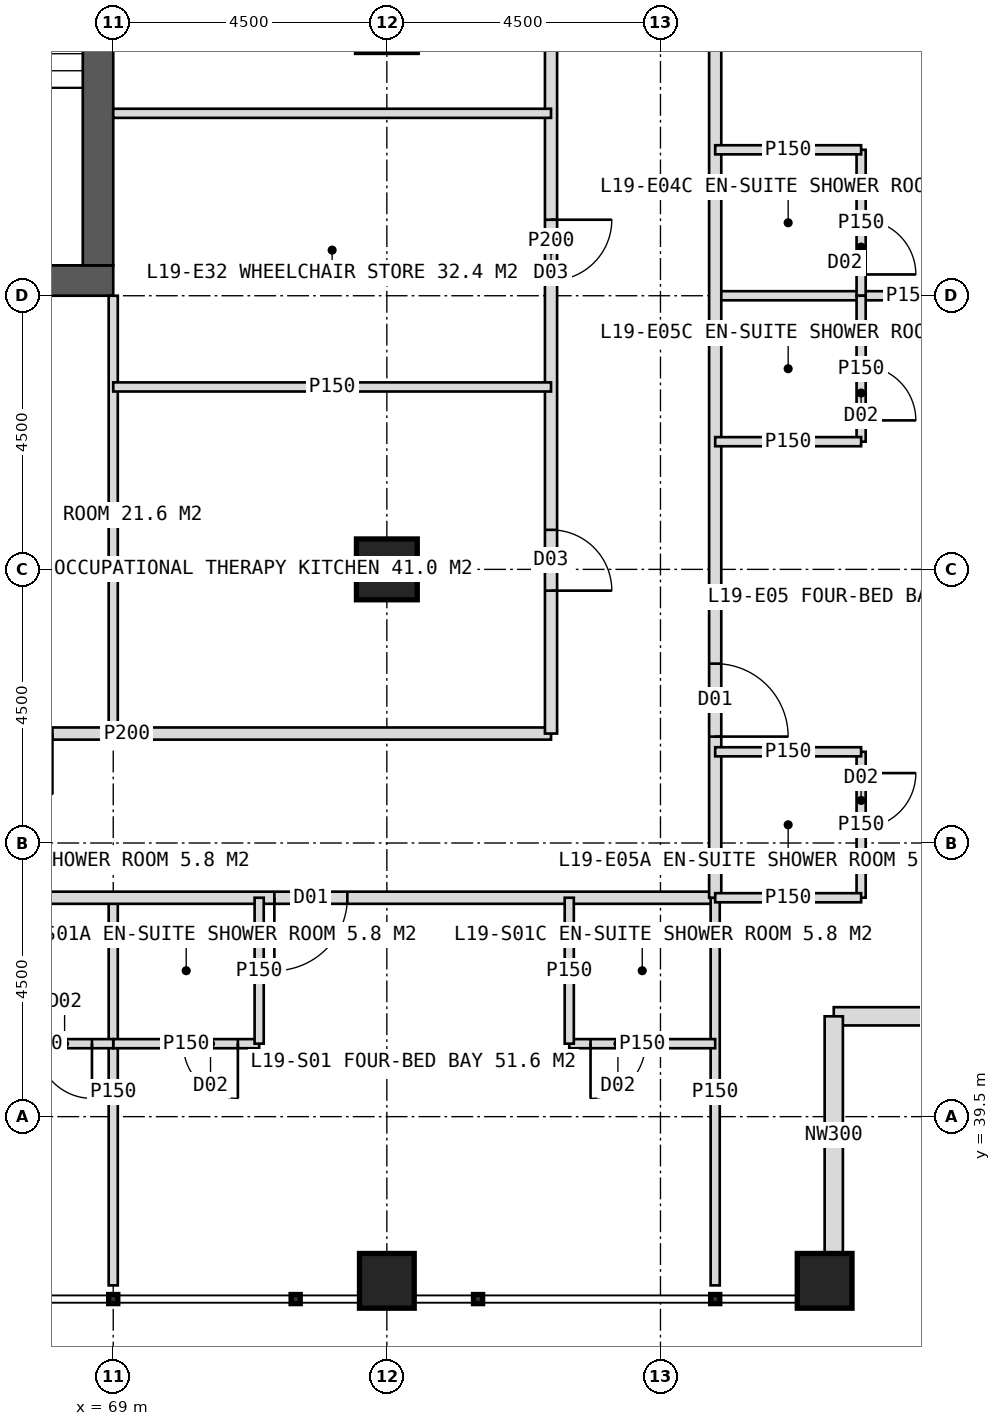
"""IFC4 building model, lengths in metres.
Left out: names, types, materials, properties, quantities, classifications, styles, units other than length and angle.
Written with IfcOpenShell. Run it as: python <this file> out.ifc"""

import sys

from ifc_helpers import new_model, si_unit, direction, frame, frame_2d, origin, origin_2d, place, context, subcontext, project, spatial, rectangle, hollow_rectangle, extrude, element, fill, save


model = new_model("IFC4")
c1 = context("Model", 3, precision=1e-05, world=origin(), true_north=direction((0.0, 1.0)))
c2 = subcontext(c1, "Body", "Model", "MODEL_VIEW")
j1 = project(units=[si_unit("LENGTHUNIT", "METRE"), si_unit("PLANEANGLEUNIT", "RADIAN")], contexts=[c1])
p1 = place(None, origin())
s1 = spatial("IfcSite", under=j1, at=p1, CompositionType="ELEMENT")
p2 = place(p1, origin())
s2 = spatial("IfcBuilding", under=s1, at=p2, CompositionType="ELEMENT")
p3 = place(p2, frame((0.0, 0.0, 83.0)))
s3 = spatial("IfcBuildingStorey", under=s2, at=p3, CompositionType="ELEMENT", Elevation=83.0)
p4 = place(p3, frame((51.0, 53.25, 0.0), z_axis=(0.0, 0.0, 1.0), x_axis=(1.0, 0.0, 0.0)))
e1 = element("IfcWall", 1, at=p4, inside=s3, PredefinedType="SHEAR", context=c2, shape_type="SweptSolid", body=[
    extrude(rectangle(XDim=18.0, YDim=0.5, at=frame_2d((9.0, 0.0))), origin(), (0.0, 0.0, 1.0), 4.0),
])
p5 = place(p4, frame((8.1, 0.0, 0.0)))
e2 = element("IfcOpeningElement", 2, at=p5, cuts=e1, PredefinedType="OPENING", context=c2, shape_type="SweptSolid", body=[
    extrude(rectangle(XDim=1.8, YDim=2.2, at=frame_2d((0.9, 1.1))), frame((0.0, 0.26, 0.0), z_axis=(0.0, -1.0, 0.0), x_axis=(1.0, 0.0, 0.0)), (0.0, 0.0, 1.0), 0.52),
])
p6 = place(p3, frame((68.75, 53.5, 0.0), z_axis=(0.0, 0.0, 1.0), x_axis=(0.0, 1.0, 0.0)))
e3 = element("IfcWall", 3, at=p6, inside=s3, PredefinedType="SHEAR", context=c2, shape_type="SweptSolid", body=[
    extrude(rectangle(XDim=17.0, YDim=0.5, at=frame_2d((8.5, 0.0))), origin(), (0.0, 0.0, 1.0), 4.0),
])
p7 = place(p6, frame((9.5, 0.0, 0.0)))
e4 = element("IfcOpeningElement", 4, at=p7, cuts=e3, PredefinedType="OPENING", context=c2, shape_type="SweptSolid", body=[
    extrude(rectangle(XDim=1.5, YDim=2.2, at=frame_2d((0.75, 1.1))), frame((0.0, 0.26, 0.0), z_axis=(0.0, -1.0, 0.0), x_axis=(1.0, 0.0, 0.0)), (0.0, 0.0, 1.0), 0.52),
])
p8 = place(p3, frame((73.5, 48.5, 0.0), z_axis=(0.0, 0.0, 1.0), x_axis=(1.0, 0.0, 0.0)))
e5 = element("IfcColumn", 5, at=p8, inside=s3, PredefinedType="COLUMN", context=c2, shape_type="SweptSolid", body=[
    extrude(hollow_rectangle(XDim=1.0, YDim=1.0, WallThickness=0.1, at=origin_2d()), origin(), (0.0, 0.0, 1.0), 4.0),
])
for number, where, z_axis, x_axis in (
    (6, (73.5, 36.8, 0.0), (0.0, 0.0, 1.0), (1.0, 0.0, 0.0)),
    (7, (80.7, 36.8, 0.0), (0.0, 0.0, 1.0), (1.0, 0.0, 0.0)),
):
    element("IfcColumn", number, at=place(p3, frame(where, z_axis=z_axis, x_axis=x_axis)), inside=s3, PredefinedType="COLUMN", context=c2, shape_type="SweptSolid", body=[
        extrude(hollow_rectangle(XDim=0.9, YDim=0.9, WallThickness=0.08, at=origin_2d()), origin(), (0.0, 0.0, 1.0), 4.0),
    ])
for number, where, z_axis, x_axis in (
    (8, (84.75, 41.15, 0.0), (0.0, 0.0, 1.0), (-1.0, 0.0, 0.0)),
    (9, (80.85, 41.15, 0.0), (0.0, 0.0, 1.0), (0.0, -1.0, 0.0)),
):
    element("IfcWall", number, at=place(p3, frame(where, z_axis=z_axis, x_axis=x_axis)), inside=s3, PredefinedType="ELEMENTEDWALL", context=c2, shape_type="SweptSolid", body=[
        extrude(rectangle(XDim=3.9, YDim=0.3, at=frame_2d((1.95, 0.0))), origin(), (0.0, 0.0, 1.0), 2.95),
    ])
p9 = place(p3, frame((69.0, 43.1, 0.0), z_axis=(0.0, 0.0, 1.0), x_axis=(0.0, -1.0, 0.0)))
e10 = element("IfcWall", 10, at=p9, inside=s3, PredefinedType="PARTITIONING", context=c2, shape_type="SweptSolid", body=[
    extrude(rectangle(XDim=6.375, YDim=0.15, at=frame_2d((3.188, 0.0))), origin(), (0.0, 0.0, 1.0), 3.75),
])
p10 = place(p3, frame((78.9, 43.1, 0.0), z_axis=(0.0, 0.0, 1.0), x_axis=(-1.0, 0.0, 0.0)))
e11 = element("IfcWall", 11, at=p10, inside=s3, PredefinedType="PARTITIONING", context=c2, shape_type="SweptSolid", body=[
    extrude(rectangle(XDim=37.8, YDim=0.2, at=frame_2d((18.9, 0.0))), origin(), (0.0, 0.0, 1.0), 3.75),
])
p11 = place(p10, frame((6.05, 0.0, 0.0)))
e12 = element("IfcOpeningElement", 12, at=p11, cuts=e11, PredefinedType="OPENING", context=c2, shape_type="SweptSolid", body=[
    extrude(rectangle(XDim=1.2, YDim=2.2, at=frame_2d((0.6, 1.1))), frame((0.0, 0.11, 0.0), z_axis=(0.0, -1.0, 0.0), x_axis=(1.0, 0.0, 0.0)), (0.0, 0.0, 1.0), 0.22),
])
p12 = place(p10, frame((12.55, 0.0, 0.0)))
e13 = element("IfcOpeningElement", 13, at=p12, cuts=e11, PredefinedType="OPENING", context=c2, shape_type="SweptSolid", body=[
    extrude(rectangle(XDim=1.2, YDim=2.2, at=frame_2d((0.6, 1.1))), frame((0.0, 0.11, 0.0), z_axis=(0.0, -1.0, 0.0), x_axis=(1.0, 0.0, 0.0)), (0.0, 0.0, 1.0), 0.22),
])
p13 = place(p10, frame((21.05, 0.0, 0.0)))
e14 = element("IfcOpeningElement", 14, at=p13, cuts=e11, PredefinedType="OPENING", context=c2, shape_type="SweptSolid", body=[
    extrude(rectangle(XDim=1.2, YDim=2.2, at=frame_2d((0.6, 1.1))), frame((0.0, 0.11, 0.0), z_axis=(0.0, -1.0, 0.0), x_axis=(1.0, 0.0, 0.0)), (0.0, 0.0, 1.0), 0.22),
])
p14 = place(p10, frame((27.55, 0.0, 0.0)))
e15 = element("IfcOpeningElement", 15, at=p14, cuts=e11, PredefinedType="OPENING", context=c2, shape_type="SweptSolid", body=[
    extrude(rectangle(XDim=1.2, YDim=2.2, at=frame_2d((0.6, 1.1))), frame((0.0, 0.11, 0.0), z_axis=(0.0, -1.0, 0.0), x_axis=(1.0, 0.0, 0.0)), (0.0, 0.0, 1.0), 0.22),
])
p15 = place(p3, frame((78.9, 43.1, 0.0), z_axis=(0.0, 0.0, 1.0), x_axis=(0.0, -1.0, 0.0)))
e16 = element("IfcWall", 16, at=p15, inside=s3, PredefinedType="PARTITIONING", context=c2, shape_type="SweptSolid", body=[
    extrude(rectangle(XDim=6.375, YDim=0.15, at=frame_2d((3.188, 0.0))), origin(), (0.0, 0.0, 1.0), 3.75),
])
p16 = place(p3, frame((71.4, 40.7, 0.0), z_axis=(0.0, 0.0, 1.0), x_axis=(-1.0, 0.0, 0.0)))
e17 = element("IfcWall", 17, at=p16, inside=s3, PredefinedType="PARTITIONING", context=c2, shape_type="SweptSolid", body=[
    extrude(rectangle(XDim=2.4, YDim=0.15, at=frame_2d((1.2, 0.0))), origin(), (0.0, 0.0, 1.0), 3.75),
])
p17 = place(p16, frame((0.35, 0.0, 0.0)))
e18 = element("IfcOpeningElement", 18, at=p17, cuts=e17, PredefinedType="OPENING", context=c2, shape_type="SweptSolid", body=[
    extrude(rectangle(XDim=0.9, YDim=2.1, at=frame_2d((0.45, 1.05))), frame((0.0, 0.085, 0.0), z_axis=(0.0, -1.0, 0.0), x_axis=(1.0, 0.0, 0.0)), (0.0, 0.0, 1.0), 0.17),
])
p18 = place(p3, frame((71.4, 43.1, 0.0), z_axis=(0.0, 0.0, 1.0), x_axis=(0.0, -1.0, 0.0)))
e19 = element("IfcWall", 19, at=p18, inside=s3, PredefinedType="PARTITIONING", context=c2, shape_type="SweptSolid", body=[
    extrude(rectangle(XDim=2.4, YDim=0.15, at=frame_2d((1.2, 0.0))), origin(), (0.0, 0.0, 1.0), 3.75),
])
p19 = place(p3, frame((78.9, 40.7, 0.0), z_axis=(0.0, 0.0, 1.0), x_axis=(-1.0, 0.0, 0.0)))
e20 = element("IfcWall", 20, at=p19, inside=s3, PredefinedType="PARTITIONING", context=c2, shape_type="SweptSolid", body=[
    extrude(rectangle(XDim=2.4, YDim=0.15, at=frame_2d((1.2, 0.0))), origin(), (0.0, 0.0, 1.0), 3.75),
])
p20 = place(p19, frame((1.15, 0.0, 0.0)))
e21 = element("IfcOpeningElement", 21, at=p20, cuts=e20, PredefinedType="OPENING", context=c2, shape_type="SweptSolid", body=[
    extrude(rectangle(XDim=0.9, YDim=2.1, at=frame_2d((0.45, 1.05))), frame((0.0, 0.085, 0.0), z_axis=(0.0, -1.0, 0.0), x_axis=(1.0, 0.0, 0.0)), (0.0, 0.0, 1.0), 0.17),
])
p21 = place(p3, frame((76.5, 43.1, 0.0), z_axis=(0.0, 0.0, 1.0), x_axis=(0.0, -1.0, 0.0)))
e22 = element("IfcWall", 22, at=p21, inside=s3, PredefinedType="PARTITIONING", context=c2, shape_type="SweptSolid", body=[
    extrude(rectangle(XDim=2.4, YDim=0.15, at=frame_2d((1.2, 0.0))), origin(), (0.0, 0.0, 1.0), 3.75),
])
p22 = place(p3, frame((69.0, 40.7, 0.0), z_axis=(0.0, 0.0, 1.0), x_axis=(-1.0, 0.0, 0.0)))
e23 = element("IfcWall", 23, at=p22, inside=s3, PredefinedType="PARTITIONING", context=c2, shape_type="SweptSolid", body=[
    extrude(rectangle(XDim=2.4, YDim=0.15, at=frame_2d((1.2, 0.0))), origin(), (0.0, 0.0, 1.0), 3.75),
])
p23 = place(p22, frame((0.35, 0.0, 0.0)))
e24 = element("IfcOpeningElement", 24, at=p23, cuts=e23, PredefinedType="OPENING", context=c2, shape_type="SweptSolid", body=[
    extrude(rectangle(XDim=0.9, YDim=2.1, at=frame_2d((0.45, 1.05))), frame((0.0, 0.085, 0.0), z_axis=(0.0, -1.0, 0.0), x_axis=(1.0, 0.0, 0.0)), (0.0, 0.0, 1.0), 0.17),
])
p24 = place(p3, frame((69.0, 53.0, 0.0), z_axis=(0.0, 0.0, 1.0), x_axis=(0.0, -1.0, 0.0)))
e25 = element("IfcWall", 25, at=p24, inside=s3, PredefinedType="PARTITIONING", context=c2, shape_type="SweptSolid", body=[
    extrude(rectangle(XDim=7.2, YDim=0.15, at=frame_2d((3.6, 0.0))), origin(), (0.0, 0.0, 1.0), 3.75),
])
p25 = place(p3, frame((76.2, 45.8, 0.0), z_axis=(0.0, 0.0, 1.0), x_axis=(-1.0, 0.0, 0.0)))
e26 = element("IfcWall", 26, at=p25, inside=s3, PredefinedType="PARTITIONING", context=c2, shape_type="SweptSolid", body=[
    extrude(rectangle(XDim=13.95, YDim=0.2, at=frame_2d((6.975, 0.0))), origin(), (0.0, 0.0, 1.0), 3.75),
])
p26 = place(p25, frame((8.2, 0.0, 0.0)))
e27 = element("IfcOpeningElement", 27, at=p26, cuts=e26, PredefinedType="OPENING", context=c2, shape_type="SweptSolid", body=[
    extrude(rectangle(XDim=1.0, YDim=2.1, at=frame_2d((0.5, 1.05))), frame((0.0, 0.11, 0.0), z_axis=(0.0, -1.0, 0.0), x_axis=(1.0, 0.0, 0.0)), (0.0, 0.0, 1.0), 0.22),
])
p27 = place(p25, frame((11.575, 0.0, 0.0)))
e28 = element("IfcOpeningElement", 28, at=p27, cuts=e26, PredefinedType="OPENING", context=c2, shape_type="SweptSolid", body=[
    extrude(rectangle(XDim=1.0, YDim=2.1, at=frame_2d((0.5, 1.05))), frame((0.0, 0.11, 0.0), z_axis=(0.0, -1.0, 0.0), x_axis=(1.0, 0.0, 0.0)), (0.0, 0.0, 1.0), 0.22),
])
p28 = place(p3, frame((78.9, 53.0, 0.0), z_axis=(0.0, 0.0, 1.0), x_axis=(1.0, 0.0, 0.0)))
e29 = element("IfcWall", 29, at=p28, inside=s3, PredefinedType="PARTITIONING", context=c2, shape_type="SweptSolid", body=[
    extrude(rectangle(XDim=6.375, YDim=0.15, at=frame_2d((3.188, 0.0))), origin(), (0.0, 0.0, 1.0), 3.75),
])
p29 = place(p3, frame((78.9, 80.9, 0.0), z_axis=(0.0, 0.0, 1.0), x_axis=(0.0, -1.0, 0.0)))
e30 = element("IfcWall", 30, at=p29, inside=s3, PredefinedType="PARTITIONING", context=c2, shape_type="SweptSolid", body=[
    extrude(rectangle(XDim=37.8, YDim=0.2, at=frame_2d((18.9, 0.0))), origin(), (0.0, 0.0, 1.0), 3.75),
])
p30 = place(p29, frame((2.45, 0.0, 0.0)))
e31 = element("IfcOpeningElement", 31, at=p30, cuts=e30, PredefinedType="OPENING", context=c2, shape_type="SweptSolid", body=[
    extrude(rectangle(XDim=1.2, YDim=2.2, at=frame_2d((0.6, 1.1))), frame((0.0, 0.11, 0.0), z_axis=(0.0, -1.0, 0.0), x_axis=(1.0, 0.0, 0.0)), (0.0, 0.0, 1.0), 0.22),
])
p31 = place(p29, frame((9.55, 0.0, 0.0)))
e32 = element("IfcOpeningElement", 32, at=p31, cuts=e30, PredefinedType="OPENING", context=c2, shape_type="SweptSolid", body=[
    extrude(rectangle(XDim=1.2, YDim=2.2, at=frame_2d((0.6, 1.1))), frame((0.0, 0.11, 0.0), z_axis=(0.0, -1.0, 0.0), x_axis=(1.0, 0.0, 0.0)), (0.0, 0.0, 1.0), 0.22),
])
p32 = place(p29, frame((15.05, 0.0, 0.0)))
e33 = element("IfcOpeningElement", 33, at=p32, cuts=e30, PredefinedType="OPENING", context=c2, shape_type="SweptSolid", body=[
    extrude(rectangle(XDim=1.2, YDim=2.2, at=frame_2d((0.6, 1.1))), frame((0.0, 0.11, 0.0), z_axis=(0.0, -1.0, 0.0), x_axis=(1.0, 0.0, 0.0)), (0.0, 0.0, 1.0), 0.22),
])
p33 = place(p29, frame((21.55, 0.0, 0.0)))
e34 = element("IfcOpeningElement", 34, at=p33, cuts=e30, PredefinedType="OPENING", context=c2, shape_type="SweptSolid", body=[
    extrude(rectangle(XDim=1.2, YDim=2.2, at=frame_2d((0.6, 1.1))), frame((0.0, 0.11, 0.0), z_axis=(0.0, -1.0, 0.0), x_axis=(1.0, 0.0, 0.0)), (0.0, 0.0, 1.0), 0.22),
])
p34 = place(p29, frame((33.95, 0.0, 0.0)))
e35 = element("IfcOpeningElement", 35, at=p34, cuts=e30, PredefinedType="OPENING", context=c2, shape_type="SweptSolid", body=[
    extrude(rectangle(XDim=1.2, YDim=2.2, at=frame_2d((0.6, 1.1))), frame((0.0, 0.11, 0.0), z_axis=(0.0, -1.0, 0.0), x_axis=(1.0, 0.0, 0.0)), (0.0, 0.0, 1.0), 0.22),
])
p35 = place(p3, frame((81.3, 55.4, 0.0), z_axis=(0.0, 0.0, 1.0), x_axis=(0.0, -1.0, 0.0)))
e36 = element("IfcWall", 36, at=p35, inside=s3, PredefinedType="PARTITIONING", context=c2, shape_type="SweptSolid", body=[
    extrude(rectangle(XDim=2.4, YDim=0.15, at=frame_2d((1.2, 0.0))), origin(), (0.0, 0.0, 1.0), 3.75),
])
p36 = place(p35, frame((1.15, 0.0, 0.0)))
e37 = element("IfcOpeningElement", 37, at=p36, cuts=e36, PredefinedType="OPENING", context=c2, shape_type="SweptSolid", body=[
    extrude(rectangle(XDim=0.9, YDim=2.1, at=frame_2d((0.45, 1.05))), frame((0.0, 0.085, 0.0), z_axis=(0.0, -1.0, 0.0), x_axis=(1.0, 0.0, 0.0)), (0.0, 0.0, 1.0), 0.17),
])
p37 = place(p3, frame((78.9, 55.4, 0.0), z_axis=(0.0, 0.0, 1.0), x_axis=(1.0, 0.0, 0.0)))
e38 = element("IfcWall", 38, at=p37, inside=s3, PredefinedType="PARTITIONING", context=c2, shape_type="SweptSolid", body=[
    extrude(rectangle(XDim=2.4, YDim=0.15, at=frame_2d((1.2, 0.0))), origin(), (0.0, 0.0, 1.0), 3.75),
])
p38 = place(p3, frame((81.3, 45.5, 0.0), z_axis=(0.0, 0.0, 1.0), x_axis=(0.0, -1.0, 0.0)))
e39 = element("IfcWall", 39, at=p38, inside=s3, PredefinedType="PARTITIONING", context=c2, shape_type="SweptSolid", body=[
    extrude(rectangle(XDim=2.4, YDim=0.15, at=frame_2d((1.2, 0.0))), origin(), (0.0, 0.0, 1.0), 3.75),
])
p39 = place(p38, frame((0.35, 0.0, 0.0)))
e40 = element("IfcOpeningElement", 40, at=p39, cuts=e39, PredefinedType="OPENING", context=c2, shape_type="SweptSolid", body=[
    extrude(rectangle(XDim=0.9, YDim=2.1, at=frame_2d((0.45, 1.05))), frame((0.0, 0.085, 0.0), z_axis=(0.0, -1.0, 0.0), x_axis=(1.0, 0.0, 0.0)), (0.0, 0.0, 1.0), 0.17),
])
p40 = place(p3, frame((78.9, 45.5, 0.0), z_axis=(0.0, 0.0, 1.0), x_axis=(1.0, 0.0, 0.0)))
e41 = element("IfcWall", 41, at=p40, inside=s3, PredefinedType="PARTITIONING", context=c2, shape_type="SweptSolid", body=[
    extrude(rectangle(XDim=2.4, YDim=0.15, at=frame_2d((1.2, 0.0))), origin(), (0.0, 0.0, 1.0), 3.75),
])
p41 = place(p3, frame((81.3, 53.0, 0.0), z_axis=(0.0, 0.0, 1.0), x_axis=(0.0, -1.0, 0.0)))
e42 = element("IfcWall", 42, at=p41, inside=s3, PredefinedType="PARTITIONING", context=c2, shape_type="SweptSolid", body=[
    extrude(rectangle(XDim=2.4, YDim=0.15, at=frame_2d((1.2, 0.0))), origin(), (0.0, 0.0, 1.0), 3.75),
])
p42 = place(p41, frame((1.15, 0.0, 0.0)))
e43 = element("IfcOpeningElement", 43, at=p42, cuts=e42, PredefinedType="OPENING", context=c2, shape_type="SweptSolid", body=[
    extrude(rectangle(XDim=0.9, YDim=2.1, at=frame_2d((0.45, 1.05))), frame((0.0, 0.085, 0.0), z_axis=(0.0, -1.0, 0.0), x_axis=(1.0, 0.0, 0.0)), (0.0, 0.0, 1.0), 0.17),
])
for number, where, z_axis, x_axis in (
    (44, (78.9, 50.6, 0.0), (0.0, 0.0, 1.0), (1.0, 0.0, 0.0)),
    (45, (78.9, 43.1, 0.0), (0.0, 0.0, 1.0), (1.0, 0.0, 0.0)),
):
    element("IfcWall", number, at=place(p3, frame(where, z_axis=z_axis, x_axis=x_axis)), inside=s3, PredefinedType="PARTITIONING", context=c2, shape_type="SweptSolid", body=[
        extrude(rectangle(XDim=2.4, YDim=0.15, at=frame_2d((1.2, 0.0))), origin(), (0.0, 0.0, 1.0), 3.75),
    ])
p43 = place(p3, frame((76.2, 62.0, 0.0), z_axis=(0.0, 0.0, 1.0), x_axis=(0.0, -1.0, 0.0)))
e46 = element("IfcWall", 46, at=p43, inside=s3, PredefinedType="PARTITIONING", context=c2, shape_type="SweptSolid", body=[
    extrude(rectangle(XDim=16.2, YDim=0.2, at=frame_2d((8.1, 0.0))), origin(), (0.0, 0.0, 1.0), 3.75),
])
p44 = place(p43, frame((2.5, 0.0, 0.0)))
e47 = element("IfcOpeningElement", 47, at=p44, cuts=e46, PredefinedType="OPENING", context=c2, shape_type="SweptSolid", body=[
    extrude(rectangle(XDim=1.0, YDim=2.1, at=frame_2d((0.5, 1.05))), frame((0.0, 0.11, 0.0), z_axis=(0.0, -1.0, 0.0), x_axis=(1.0, 0.0, 0.0)), (0.0, 0.0, 1.0), 0.22),
])
p45 = place(p43, frame((7.75, 0.0, 0.0)))
e48 = element("IfcOpeningElement", 48, at=p45, cuts=e46, PredefinedType="OPENING", context=c2, shape_type="SweptSolid", body=[
    extrude(rectangle(XDim=1.0, YDim=2.1, at=frame_2d((0.5, 1.05))), frame((0.0, 0.11, 0.0), z_axis=(0.0, -1.0, 0.0), x_axis=(1.0, 0.0, 0.0)), (0.0, 0.0, 1.0), 0.22),
])
p46 = place(p43, frame((12.85, 0.0, 0.0)))
e49 = element("IfcOpeningElement", 49, at=p46, cuts=e46, PredefinedType="OPENING", context=c2, shape_type="SweptSolid", body=[
    extrude(rectangle(XDim=1.0, YDim=2.1, at=frame_2d((0.5, 1.05))), frame((0.0, 0.11, 0.0), z_axis=(0.0, -1.0, 0.0), x_axis=(1.0, 0.0, 0.0)), (0.0, 0.0, 1.0), 0.22),
])
for number, where, z_axis, x_axis in (
    (50, (69.0, 56.0, 0.0), (0.0, 0.0, 1.0), (1.0, 0.0, 0.0)),
    (51, (69.0, 51.5, 0.0), (0.0, 0.0, 1.0), (1.0, 0.0, 0.0)),
):
    element("IfcWall", number, at=place(p3, frame(where, z_axis=z_axis, x_axis=x_axis)), inside=s3, PredefinedType="PARTITIONING", context=c2, shape_type="SweptSolid", body=[
        extrude(rectangle(XDim=7.2, YDim=0.15, at=frame_2d((3.6, 0.0))), origin(), (0.0, 0.0, 1.0), 3.75),
    ])
p47 = place(p11, origin())
e52 = element("IfcDoor", 52, at=p47, inside=s3, OperationType="SINGLE_SWING_RIGHT", PredefinedType="DOOR", context=c2, shape_type="SweptSolid", body=[
    extrude(rectangle(XDim=1.2, YDim=2.2, at=frame_2d((0.6, 1.1))), frame((0.0, 0.025, 0.0), z_axis=(0.0, -1.0, 0.0), x_axis=(1.0, 0.0, 0.0)), (0.0, 0.0, 1.0), 0.05),
])
fill(e12, e52)
p48 = place(p17, origin())
e53 = element("IfcDoor", 53, at=p48, inside=s3, OperationType="SINGLE_SWING_LEFT", PredefinedType="DOOR", context=c2, shape_type="SweptSolid", body=[
    extrude(rectangle(XDim=0.9, YDim=2.1, at=frame_2d((0.45, 1.05))), frame((0.0, 0.025, 0.0), z_axis=(0.0, -1.0, 0.0), x_axis=(1.0, 0.0, 0.0)), (0.0, 0.0, 1.0), 0.05),
])
fill(e18, e53)
p49 = place(p20, origin())
e54 = element("IfcDoor", 54, at=p49, inside=s3, OperationType="SINGLE_SWING_RIGHT", PredefinedType="DOOR", context=c2, shape_type="SweptSolid", body=[
    extrude(rectangle(XDim=0.9, YDim=2.1, at=frame_2d((0.45, 1.05))), frame((0.0, 0.025, 0.0), z_axis=(0.0, -1.0, 0.0), x_axis=(1.0, 0.0, 0.0)), (0.0, 0.0, 1.0), 0.05),
])
fill(e21, e54)
p50 = place(p23, origin())
e55 = element("IfcDoor", 55, at=p50, inside=s3, OperationType="SINGLE_SWING_LEFT", PredefinedType="DOOR", context=c2, shape_type="SweptSolid", body=[
    extrude(rectangle(XDim=0.9, YDim=2.1, at=frame_2d((0.45, 1.05))), frame((0.0, 0.025, 0.0), z_axis=(0.0, -1.0, 0.0), x_axis=(1.0, 0.0, 0.0)), (0.0, 0.0, 1.0), 0.05),
])
fill(e24, e55)
p51 = place(p36, origin())
e56 = element("IfcDoor", 56, at=p51, inside=s3, OperationType="SINGLE_SWING_RIGHT", PredefinedType="DOOR", context=c2, shape_type="SweptSolid", body=[
    extrude(rectangle(XDim=0.9, YDim=2.1, at=frame_2d((0.45, 1.05))), frame((0.0, 0.025, 0.0), z_axis=(0.0, -1.0, 0.0), x_axis=(1.0, 0.0, 0.0)), (0.0, 0.0, 1.0), 0.05),
])
fill(e37, e56)
p52 = place(p34, origin())
e57 = element("IfcDoor", 57, at=p52, inside=s3, OperationType="SINGLE_SWING_RIGHT", PredefinedType="DOOR", context=c2, shape_type="SweptSolid", body=[
    extrude(rectangle(XDim=1.2, YDim=2.2, at=frame_2d((0.6, 1.1))), frame((0.0, 0.025, 0.0), z_axis=(0.0, -1.0, 0.0), x_axis=(1.0, 0.0, 0.0)), (0.0, 0.0, 1.0), 0.05),
])
fill(e35, e57)
p53 = place(p39, origin())
e58 = element("IfcDoor", 58, at=p53, inside=s3, OperationType="SINGLE_SWING_LEFT", PredefinedType="DOOR", context=c2, shape_type="SweptSolid", body=[
    extrude(rectangle(XDim=0.9, YDim=2.1, at=frame_2d((0.45, 1.05))), frame((0.0, 0.025, 0.0), z_axis=(0.0, -1.0, 0.0), x_axis=(1.0, 0.0, 0.0)), (0.0, 0.0, 1.0), 0.05),
])
fill(e40, e58)
p54 = place(p42, origin())
e59 = element("IfcDoor", 59, at=p54, inside=s3, OperationType="SINGLE_SWING_RIGHT", PredefinedType="DOOR", context=c2, shape_type="SweptSolid", body=[
    extrude(rectangle(XDim=0.9, YDim=2.1, at=frame_2d((0.45, 1.05))), frame((0.0, 0.025, 0.0), z_axis=(0.0, -1.0, 0.0), x_axis=(1.0, 0.0, 0.0)), (0.0, 0.0, 1.0), 0.05),
])
fill(e43, e59)
p55 = place(p45, origin())
e60 = element("IfcDoor", 60, at=p55, inside=s3, OperationType="SINGLE_SWING_LEFT", PredefinedType="DOOR", context=c2, shape_type="SweptSolid", body=[
    extrude(rectangle(XDim=1.0, YDim=2.1, at=frame_2d((0.5, 1.05))), frame((0.0, 0.025, 0.0), z_axis=(0.0, -1.0, 0.0), x_axis=(1.0, 0.0, 0.0)), (0.0, 0.0, 1.0), 0.05),
])
fill(e48, e60)
p56 = place(p46, origin())
e61 = element("IfcDoor", 61, at=p56, inside=s3, OperationType="SINGLE_SWING_RIGHT", PredefinedType="DOOR", context=c2, shape_type="SweptSolid", body=[
    extrude(rectangle(XDim=1.0, YDim=2.1, at=frame_2d((0.5, 1.05))), frame((0.0, 0.025, 0.0), z_axis=(0.0, -1.0, 0.0), x_axis=(1.0, 0.0, 0.0)), (0.0, 0.0, 1.0), 0.05),
])
fill(e49, e61)
save(model, sys.argv[1])
